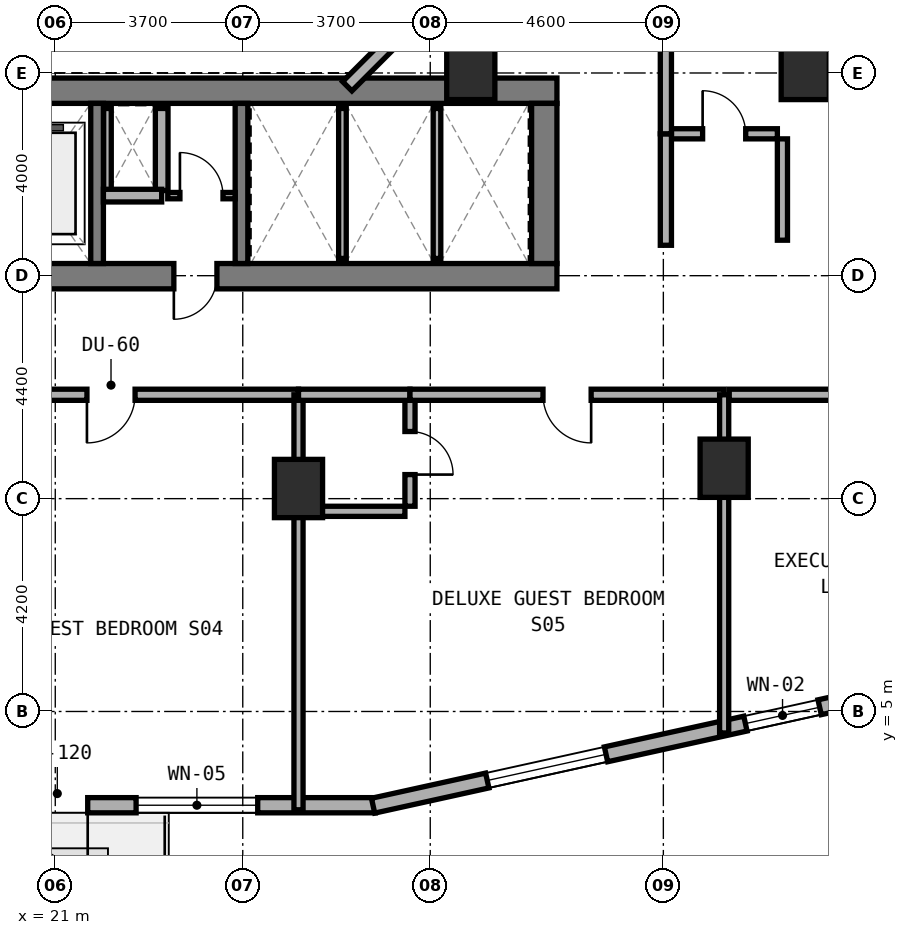
"""IFC4 building model, lengths in metres.
Left out: names, types, materials, properties, quantities, classifications, styles, units other than length and angle.
Written with IfcOpenShell. Run it as: python <this file> out.ifc"""

import sys

from ifc_helpers import new_model, si_unit, direction, frame, frame_2d, origin, origin_2d, place, context, subcontext, project, spatial, rectangle, extrude, element, fill, save


model = new_model("IFC4")
c1 = context("Model", 3, precision=1e-05, world=origin(), true_north=direction((0.0, 1.0)))
c2 = subcontext(c1, "Body", "Model", "MODEL_VIEW")
j1 = project(units=[si_unit("LENGTHUNIT", "METRE"), si_unit("PLANEANGLEUNIT", "RADIAN")], contexts=[c1])
p1 = place(None, origin())
s1 = spatial("IfcSite", under=j1, at=p1, CompositionType="ELEMENT")
p2 = place(p1, origin())
s2 = spatial("IfcBuilding", under=s1, at=p2, CompositionType="ELEMENT")
p3 = place(p2, frame((0.0, 0.0, 59.0)))
s3 = spatial("IfcBuildingStorey", under=s2, at=p3, CompositionType="ELEMENT", Elevation=59.0)
p4 = place(p3, frame((6.3, 13.59, 0.0), z_axis=(0.0, 0.0, 1.0), x_axis=(1.0, 0.0, 0.0)))
e1 = element("IfcWall", 1, at=p4, inside=s3, PredefinedType="SHEAR", context=c2, shape_type="SweptSolid", body=[
    extrude(rectangle(XDim=24.6, YDim=0.5, at=frame_2d((12.3, 0.0))), origin(), (0.0, 0.0, 1.0), 3.5),
])
p5 = place(p4, frame((9.25, 0.0, 0.0)))
e2 = element("IfcOpeningElement", 2, at=p5, cuts=e1, PredefinedType="OPENING", context=c2, shape_type="SweptSolid", body=[
    extrude(rectangle(XDim=1.2, YDim=2.15, at=frame_2d((0.6, 1.075))), frame((0.0, 0.26, 0.0), z_axis=(0.0, -1.0, 0.0), x_axis=(1.0, 0.0, 0.0)), (0.0, 0.0, 1.0), 0.52),
])
p6 = place(p4, frame((17.04, 0.0, 0.0)))
e3 = element("IfcOpeningElement", 3, at=p6, cuts=e1, PredefinedType="OPENING", context=c2, shape_type="SweptSolid", body=[
    extrude(rectangle(XDim=0.85, YDim=2.1, at=frame_2d((0.425, 1.05))), frame((0.0, 0.26, 0.0), z_axis=(0.0, -1.0, 0.0), x_axis=(1.0, 0.0, 0.0)), (0.0, 0.0, 1.0), 0.52),
])
p7 = place(p3, frame((6.3, 17.25, 0.0), z_axis=(0.0, 0.0, 1.0), x_axis=(1.0, 0.0, 0.0)))
e4 = element("IfcWall", 4, at=p7, inside=s3, PredefinedType="SHEAR", context=c2, shape_type="SweptSolid", body=[
    extrude(rectangle(XDim=24.6, YDim=0.5, at=frame_2d((12.3, 0.0))), origin(), (0.0, 0.0, 1.0), 3.5),
])
p8 = place(p3, frame((30.65, 13.84, 0.0), z_axis=(0.0, 0.0, 1.0), x_axis=(0.0, 1.0, 0.0)))
e5 = element("IfcWall", 5, at=p8, inside=s3, PredefinedType="SHEAR", context=c2, shape_type="SweptSolid", body=[
    extrude(rectangle(XDim=3.16, YDim=0.5, at=frame_2d((1.58, 0.0))), origin(), (0.0, 0.0, 1.0), 3.5),
])
for number, where, z_axis, x_axis in (
    (6, (21.825, 13.84, 0.0), (0.0, 0.0, 1.0), (0.0, 1.0, 0.0)),
    (7, (24.675, 13.84, 0.0), (0.0, 0.0, 1.0), (0.0, 1.0, 0.0)),
):
    element("IfcWall", number, at=place(p3, frame(where, z_axis=z_axis, x_axis=x_axis)), inside=s3, PredefinedType="STANDARD", context=c2, shape_type="SweptSolid", body=[
        extrude(rectangle(XDim=3.16, YDim=0.25, at=frame_2d((1.58, 0.0))), origin(), (0.0, 0.0, 1.0), 3.22),
    ])
for number, where, z_axis, x_axis in (
    (8, (25.8, 9.4, 0.0), (0.0, 0.0, 1.0), (1.0, 0.0, 0.0)),
    (9, (34.2, 9.8, 0.0), (0.0, 0.0, 1.0), (1.0, 0.0, 0.0)),
    (10, (35.8, 17.65, 0.0), (0.0, 0.0, 1.0), (1.0, 0.0, 0.0)),
    (11, (29.2, 17.65, 0.0), (0.0, 0.0, 1.0), (1.0, 0.0, 0.0)),
):
    element("IfcColumn", number, at=place(p3, frame(where, z_axis=z_axis, x_axis=x_axis)), inside=s3, PredefinedType="COLUMN", context=c2, shape_type="SweptSolid", body=[
        extrude(rectangle(XDim=0.95, YDim=1.15, at=origin_2d()), origin(), (0.0, 0.0, 1.0), 3.5),
    ])
p9 = place(p3, frame((14.727, 3.15, 0.0), z_axis=(0.0, 0.0, 1.0), x_axis=(1.0, 0.0, 0.0)))
e12 = element("IfcWall", 12, at=p9, inside=s3, PredefinedType="STANDARD", context=c2, shape_type="SweptSolid", body=[
    extrude(rectangle(XDim=12.591, YDim=0.3, at=frame_2d((6.295, 0.0))), origin(), (0.0, 0.0, 1.0), 3.22),
])
p10 = place(p9, frame((5.713, 0.0, 0.0)))
e13 = element("IfcOpeningElement", 13, at=p10, cuts=e12, PredefinedType="OPENING", context=c2, shape_type="SweptSolid", body=[
    extrude(rectangle(XDim=1.2, YDim=2.15, at=frame_2d((0.6, 1.075))), frame((0.0, 0.16, 0.0), z_axis=(0.0, -1.0, 0.0), x_axis=(1.0, 0.0, 0.0)), (0.0, 0.0, 1.0), 0.32),
])
p11 = place(p9, frame((2.318, 0.0, 0.8)))
e14 = element("IfcOpeningElement", 14, at=p11, cuts=e12, PredefinedType="OPENING", context=c2, shape_type="SweptSolid", body=[
    extrude(rectangle(XDim=2.4, YDim=1.6, at=frame_2d((1.2, 0.8))), frame((0.0, 0.16, 0.0), z_axis=(0.0, -1.0, 0.0), x_axis=(1.0, 0.0, 0.0)), (0.0, 0.0, 1.0), 0.32),
])
p12 = place(p9, frame((7.868, 0.0, 0.8)))
e15 = element("IfcOpeningElement", 15, at=p12, cuts=e12, PredefinedType="OPENING", context=c2, shape_type="SweptSolid", body=[
    extrude(rectangle(XDim=2.4, YDim=1.6, at=frame_2d((1.2, 0.8))), frame((0.0, 0.16, 0.0), z_axis=(0.0, -1.0, 0.0), x_axis=(1.0, 0.0, 0.0)), (0.0, 0.0, 1.0), 0.32),
])
p13 = place(p3, frame((27.272, 3.141, 0.0), z_axis=(0.0, 0.0, 1.0), x_axis=(0.976555357219, 0.21526642629, 0.0)))
e16 = element("IfcWall", 16, at=p13, inside=s3, PredefinedType="STANDARD", context=c2, shape_type="SweptSolid", body=[
    extrude(rectangle(XDim=9.323, YDim=0.3, at=frame_2d((4.661, 0.0))), origin(), (0.0, 0.0, 1.0), 3.22),
])
p14 = place(p13, frame((2.307, 0.0, 0.8)))
e17 = element("IfcOpeningElement", 17, at=p14, cuts=e16, PredefinedType="OPENING", context=c2, shape_type="SweptSolid", body=[
    extrude(rectangle(XDim=2.4, YDim=1.6, at=frame_2d((1.2, 0.8))), frame((0.0, 0.16, 0.0), z_axis=(0.0, -1.0, 0.0), x_axis=(1.0, 0.0, 0.0)), (0.0, 0.0, 1.0), 0.32),
])
p15 = place(p13, frame((7.524, 0.0, 0.85)))
e18 = element("IfcOpeningElement", 18, at=p15, cuts=e16, PredefinedType="OPENING", context=c2, shape_type="SweptSolid", body=[
    extrude(rectangle(XDim=1.5, YDim=1.5, at=frame_2d((0.75, 0.75))), frame((0.0, 0.16, 0.0), z_axis=(0.0, -1.0, 0.0), x_axis=(1.0, 0.0, 0.0)), (0.0, 0.0, 1.0), 0.32),
])
p16 = place(p3, frame((26.762, 17.338, 0.0), z_axis=(0.0, 0.0, 1.0), x_axis=(0.707059717605, 0.707153841636, 0.0)))
e19 = element("IfcWall", 19, at=p16, inside=s3, PredefinedType="STANDARD", context=c2, shape_type="SweptSolid", body=[
    extrude(rectangle(XDim=2.594, YDim=0.26, at=frame_2d((1.297, 0.0))), origin(), (0.0, 0.0, 1.0), 3.22),
])
p17 = place(p3, frame((22.03, 15.28, 0.0), z_axis=(0.0, 0.0, 1.0), x_axis=(0.0, 1.0, 0.0)))
e20 = element("IfcWall", 20, at=p17, inside=s3, PredefinedType="PARTITIONING", context=c2, shape_type="SweptSolid", body=[
    extrude(rectangle(XDim=1.62, YDim=0.15, at=frame_2d((0.81, 0.0))), origin(), (0.0, 0.0, 1.0), 3.22),
])
p18 = place(p3, frame((23.1, 15.28, 0.0), z_axis=(0.0, 0.0, 1.0), x_axis=(0.0, 1.0, 0.0)))
e21 = element("IfcWall", 21, at=p18, inside=s3, PredefinedType="SOLIDWALL", context=c2, shape_type="SweptSolid", body=[
    extrude(rectangle(XDim=1.62, YDim=0.25, at=frame_2d((0.81, 0.0))), origin(), (0.0, 0.0, 1.0), 3.22),
])
p19 = place(p3, frame((21.95, 15.18, 0.0), z_axis=(0.0, 0.0, 1.0), x_axis=(1.0, 0.0, 0.0)))
e22 = element("IfcWall", 22, at=p19, inside=s3, PredefinedType="SOLIDWALL", context=c2, shape_type="SweptSolid", body=[
    extrude(rectangle(XDim=1.15, YDim=0.25, at=frame_2d((0.575, 0.0))), origin(), (0.0, 0.0, 1.0), 3.22),
])
p20 = place(p3, frame((23.22, 15.18, 0.0), z_axis=(0.0, 0.0, 1.0), x_axis=(1.0, 0.0, 0.0)))
e23 = element("IfcWall", 23, at=p20, inside=s3, PredefinedType="PARTITIONING", context=c2, shape_type="SweptSolid", body=[
    extrude(rectangle(XDim=1.33, YDim=0.125, at=frame_2d((0.665, 0.0))), origin(), (0.0, 0.0, 1.0), 3.22),
])
p21 = place(p20, frame((0.24, 0.0, 0.0)))
e24 = element("IfcOpeningElement", 24, at=p21, cuts=e23, PredefinedType="OPENING", context=c2, shape_type="SweptSolid", body=[
    extrude(rectangle(XDim=0.85, YDim=2.1, at=frame_2d((0.425, 1.05))), frame((0.0, 0.073, 0.0), z_axis=(0.0, -1.0, 0.0), x_axis=(1.0, 0.0, 0.0)), (0.0, 0.0, 1.0), 0.145),
])
p22 = place(p3, frame((26.667, 13.94, 0.0), z_axis=(0.0, 0.0, 1.0), x_axis=(0.0, 1.0, 0.0)))
e25 = element("IfcWall", 25, at=p22, inside=s3, PredefinedType="PARTITIONING", context=c2, shape_type="SweptSolid", body=[
    extrude(rectangle(XDim=2.96, YDim=0.15, at=frame_2d((1.48, 0.0))), origin(), (0.0, 0.0, 1.0), 3.22),
])
p23 = place(p3, frame((28.533, 13.94, 0.0), z_axis=(0.0, 0.0, 1.0), x_axis=(0.0, 1.0, 0.0)))
e26 = element("IfcWall", 26, at=p23, inside=s3, PredefinedType="PARTITIONING", context=c2, shape_type="SweptSolid", body=[
    extrude(rectangle(XDim=2.96, YDim=0.15, at=frame_2d((1.48, 0.0))), origin(), (0.0, 0.0, 1.0), 2.495),
])
p24 = place(p3, frame((18.4, 11.25, 0.0), z_axis=(0.0, 0.0, 1.0), x_axis=(1.0, 0.0, 0.0)))
e27 = element("IfcWall", 27, at=p24, inside=s3, PredefinedType="SOLIDWALL", context=c2, shape_type="SweptSolid", body=[
    extrude(rectangle(XDim=7.4, YDim=0.22, at=frame_2d((3.7, 0.0))), origin(), (0.0, 0.0, 1.0), 2.495),
])
p25 = place(p24, frame((3.225, 0.0, 0.0)))
e28 = element("IfcOpeningElement", 28, at=p25, cuts=e27, PredefinedType="OPENING", context=c2, shape_type="SweptSolid", body=[
    extrude(rectangle(XDim=0.95, YDim=2.1, at=frame_2d((0.475, 1.05))), frame((0.0, 0.12, 0.0), z_axis=(0.0, -1.0, 0.0), x_axis=(1.0, 0.0, 0.0)), (0.0, 0.0, 1.0), 0.24),
])
p26 = place(p3, frame((25.8, 3.06, 0.0), z_axis=(0.0, 0.0, 1.0), x_axis=(0.0, 1.0, 0.0)))
e29 = element("IfcWall", 29, at=p26, inside=s3, PredefinedType="SOLIDWALL", context=c2, shape_type="SweptSolid", body=[
    extrude(rectangle(XDim=8.19, YDim=0.18, at=frame_2d((4.095, 0.0))), origin(), (0.0, 0.0, 1.0), 2.495),
])
p27 = place(p3, frame((28.0, 9.05, 0.0), z_axis=(0.0, 0.0, 1.0), x_axis=(0.0, 1.0, 0.0)))
e30 = element("IfcWall", 30, at=p27, inside=s3, PredefinedType="PLUMBINGWALL", context=c2, shape_type="SweptSolid", body=[
    extrude(rectangle(XDim=2.1, YDim=0.2, at=frame_2d((1.05, 0.0))), origin(), (0.0, 0.0, 1.0), 2.745),
])
p28 = place(p27, frame((0.625, 0.0, 0.0)))
e31 = element("IfcOpeningElement", 31, at=p28, cuts=e30, PredefinedType="OPENING", context=c2, shape_type="SweptSolid", body=[
    extrude(rectangle(XDim=0.85, YDim=2.1, at=frame_2d((0.425, 1.05))), frame((0.0, 0.11, 0.0), z_axis=(0.0, -1.0, 0.0), x_axis=(1.0, 0.0, 0.0)), (0.0, 0.0, 1.0), 0.22),
])
p29 = place(p3, frame((25.9, 8.95, 0.0), z_axis=(0.0, 0.0, 1.0), x_axis=(1.0, 0.0, 0.0)))
e32 = element("IfcWall", 32, at=p29, inside=s3, PredefinedType="PLUMBINGWALL", context=c2, shape_type="SweptSolid", body=[
    extrude(rectangle(XDim=2.0, YDim=0.2, at=frame_2d((1.0, 0.0))), origin(), (0.0, 0.0, 1.0), 3.22),
])
p30 = place(p3, frame((25.8, 11.25, 0.0), z_axis=(0.0, 0.0, 1.0), x_axis=(1.0, 0.0, 0.0)))
e33 = element("IfcWall", 33, at=p30, inside=s3, PredefinedType="SOLIDWALL", context=c2, shape_type="SweptSolid", body=[
    extrude(rectangle(XDim=2.2, YDim=0.22, at=frame_2d((1.1, 0.0))), origin(), (0.0, 0.0, 1.0), 2.495),
])
p31 = place(p3, frame((28.0, 11.25, 0.0), z_axis=(0.0, 0.0, 1.0), x_axis=(1.0, 0.0, 0.0)))
e34 = element("IfcWall", 34, at=p31, inside=s3, PredefinedType="SOLIDWALL", context=c2, shape_type="SweptSolid", body=[
    extrude(rectangle(XDim=6.2, YDim=0.22, at=frame_2d((3.1, 0.0))), origin(), (0.0, 0.0, 1.0), 2.495),
])
p32 = place(p31, frame((2.625, 0.0, 0.0)))
e35 = element("IfcOpeningElement", 35, at=p32, cuts=e34, PredefinedType="OPENING", context=c2, shape_type="SweptSolid", body=[
    extrude(rectangle(XDim=0.95, YDim=2.1, at=frame_2d((0.475, 1.05))), frame((0.0, 0.12, 0.0), z_axis=(0.0, -1.0, 0.0), x_axis=(1.0, 0.0, 0.0)), (0.0, 0.0, 1.0), 0.24),
])
p33 = place(p3, frame((34.2, 4.576, 0.0), z_axis=(0.0, 0.0, 1.0), x_axis=(0.0, 1.0, 0.0)))
e36 = element("IfcWall", 36, at=p33, inside=s3, PredefinedType="SOLIDWALL", context=c2, shape_type="SweptSolid", body=[
    extrude(rectangle(XDim=6.674, YDim=0.18, at=frame_2d((3.337, 0.0))), origin(), (0.0, 0.0, 1.0), 2.495),
])
p34 = place(p3, frame((34.3, 11.25, 0.0), z_axis=(0.0, 0.0, 1.0), x_axis=(1.0, 0.0, 0.0)))
e37 = element("IfcWall", 37, at=p34, inside=s3, PredefinedType="SOLIDWALL", context=c2, shape_type="SweptSolid", body=[
    extrude(rectangle(XDim=7.44, YDim=0.22, at=frame_2d((3.72, 0.0))), origin(), (0.0, 0.0, 1.0), 2.745),
])
p35 = place(p34, frame((2.911, 0.0, 0.0)))
e38 = element("IfcOpeningElement", 38, at=p35, cuts=e37, PredefinedType="OPENING", context=c2, shape_type="SweptSolid", body=[
    extrude(rectangle(XDim=0.95, YDim=2.1, at=frame_2d((0.475, 1.05))), frame((0.0, 0.12, 0.0), z_axis=(0.0, -1.0, 0.0), x_axis=(1.0, 0.0, 0.0)), (0.0, 0.0, 1.0), 0.24),
])
p36 = place(p3, frame((33.15, 16.4, 0.0), z_axis=(0.0, 0.0, 1.0), x_axis=(1.0, 0.0, 0.0)))
e39 = element("IfcWall", 39, at=p36, inside=s3, PredefinedType="PLUMBINGWALL", context=c2, shape_type="SweptSolid", body=[
    extrude(rectangle(XDim=2.1, YDim=0.2, at=frame_2d((1.05, 0.0))), origin(), (0.0, 0.0, 1.0), 3.22),
])
p37 = place(p36, frame((0.625, 0.0, 0.0)))
e40 = element("IfcOpeningElement", 40, at=p37, cuts=e39, PredefinedType="OPENING", context=c2, shape_type="SweptSolid", body=[
    extrude(rectangle(XDim=0.85, YDim=2.1, at=frame_2d((0.425, 1.05))), frame((0.0, 0.11, 0.0), z_axis=(0.0, -1.0, 0.0), x_axis=(1.0, 0.0, 0.0)), (0.0, 0.0, 1.0), 0.22),
])
p38 = place(p3, frame((35.35, 14.3, 0.0), z_axis=(0.0, 0.0, 1.0), x_axis=(0.0, 1.0, 0.0)))
e41 = element("IfcWall", 41, at=p38, inside=s3, PredefinedType="PLUMBINGWALL", context=c2, shape_type="SweptSolid", body=[
    extrude(rectangle(XDim=2.0, YDim=0.2, at=frame_2d((1.0, 0.0))), origin(), (0.0, 0.0, 1.0), 2.745),
])
p39 = place(p3, frame((33.05, 14.2, 0.0), z_axis=(0.0, 0.0, 1.0), x_axis=(0.0, 1.0, 0.0)))
e42 = element("IfcWall", 42, at=p39, inside=s3, PredefinedType="SOLIDWALL", context=c2, shape_type="SweptSolid", body=[
    extrude(rectangle(XDim=2.2, YDim=0.22, at=frame_2d((1.1, 0.0))), origin(), (0.0, 0.0, 1.0), 3.22),
])
p40 = place(p3, frame((33.05, 16.4, 0.0), z_axis=(0.0, 0.0, 1.0), x_axis=(0.0, 1.0, 0.0)))
e43 = element("IfcWall", 43, at=p40, inside=s3, PredefinedType="SOLIDWALL", context=c2, shape_type="SweptSolid", body=[
    extrude(rectangle(XDim=6.134, YDim=0.22, at=frame_2d((3.067, 0.0))), origin(), (0.0, 0.0, 1.0), 2.495),
])
p41 = place(p40, frame((2.592, 0.0, 0.0)))
e44 = element("IfcOpeningElement", 44, at=p41, cuts=e43, PredefinedType="OPENING", context=c2, shape_type="SweptSolid", body=[
    extrude(rectangle(XDim=0.95, YDim=2.1, at=frame_2d((0.475, 1.05))), frame((0.0, 0.12, 0.0), z_axis=(0.0, -1.0, 0.0), x_axis=(1.0, 0.0, 0.0)), (0.0, 0.0, 1.0), 0.24),
])
p42 = place(p10, frame((1.2, 0.0, 0.0), z_axis=(0.0, 0.0, 1.0), x_axis=(-1.0, 0.0, 0.0)))
e45 = element("IfcDoor", 45, at=p42, inside=s3, OperationType="SINGLE_SWING_LEFT", PredefinedType="DOOR", context=c2, shape_type="SweptSolid", body=[
    extrude(rectangle(XDim=1.2, YDim=2.15, at=frame_2d((0.6, 1.075))), frame((0.0, 0.025, 0.0), z_axis=(0.0, -1.0, 0.0), x_axis=(1.0, 0.0, 0.0)), (0.0, 0.0, 1.0), 0.05),
])
fill(e13, e45)
p43 = place(p12, origin())
e46 = element("IfcWindow", 46, at=p43, inside=s3, PartitioningType="SINGLE_PANEL", PredefinedType="WINDOW", context=c2, shape_type="SweptSolid", body=[
    extrude(rectangle(XDim=2.4, YDim=1.6, at=frame_2d((1.2, 0.8))), frame((0.0, 0.03, 0.0), z_axis=(0.0, -1.0, 0.0), x_axis=(1.0, 0.0, 0.0)), (0.0, 0.0, 1.0), 0.06),
])
fill(e15, e46)
p44 = place(p14, origin())
e47 = element("IfcWindow", 47, at=p44, inside=s3, PartitioningType="SINGLE_PANEL", PredefinedType="WINDOW", context=c2, shape_type="SweptSolid", body=[
    extrude(rectangle(XDim=2.4, YDim=1.6, at=frame_2d((1.2, 0.8))), frame((0.0, 0.03, 0.0), z_axis=(0.0, -1.0, 0.0), x_axis=(1.0, 0.0, 0.0)), (0.0, 0.0, 1.0), 0.06),
])
fill(e17, e47)
p45 = place(p15, origin())
e48 = element("IfcWindow", 48, at=p45, inside=s3, PartitioningType="SINGLE_PANEL", PredefinedType="WINDOW", context=c2, shape_type="SweptSolid", body=[
    extrude(rectangle(XDim=1.5, YDim=1.5, at=frame_2d((0.75, 0.75))), frame((0.0, 0.03, 0.0), z_axis=(0.0, -1.0, 0.0), x_axis=(1.0, 0.0, 0.0)), (0.0, 0.0, 1.0), 0.06),
])
fill(e18, e48)
p46 = place(p6, frame((0.85, 0.0, 0.0), z_axis=(0.0, 0.0, 1.0), x_axis=(-1.0, 0.0, 0.0)))
e49 = element("IfcDoor", 49, at=p46, inside=s3, OperationType="SINGLE_SWING_RIGHT", PredefinedType="DOOR", context=c2, shape_type="SweptSolid", body=[
    extrude(rectangle(XDim=0.85, YDim=2.1, at=frame_2d((0.425, 1.05))), frame((0.0, 0.025, 0.0), z_axis=(0.0, -1.0, 0.0), x_axis=(1.0, 0.0, 0.0)), (0.0, 0.0, 1.0), 0.05),
])
fill(e3, e49)
p47 = place(p21, origin())
e50 = element("IfcDoor", 50, at=p47, inside=s3, OperationType="SINGLE_SWING_LEFT", PredefinedType="DOOR", context=c2, shape_type="SweptSolid", body=[
    extrude(rectangle(XDim=0.85, YDim=2.1, at=frame_2d((0.425, 1.05))), frame((0.0, 0.025, 0.0), z_axis=(0.0, -1.0, 0.0), x_axis=(1.0, 0.0, 0.0)), (0.0, 0.0, 1.0), 0.05),
])
fill(e24, e50)
p48 = place(p25, frame((0.95, 0.0, 0.0), z_axis=(0.0, 0.0, 1.0), x_axis=(-1.0, 0.0, 0.0)))
e51 = element("IfcDoor", 51, at=p48, inside=s3, OperationType="SINGLE_SWING_RIGHT", PredefinedType="DOOR", context=c2, shape_type="SweptSolid", body=[
    extrude(rectangle(XDim=0.95, YDim=2.1, at=frame_2d((0.475, 1.05))), frame((0.0, 0.025, 0.0), z_axis=(0.0, -1.0, 0.0), x_axis=(1.0, 0.0, 0.0)), (0.0, 0.0, 1.0), 0.05),
])
fill(e28, e51)
p49 = place(p28, frame((0.85, 0.0, 0.0), z_axis=(0.0, 0.0, 1.0), x_axis=(-1.0, 0.0, 0.0)))
e52 = element("IfcDoor", 52, at=p49, inside=s3, OperationType="SINGLE_SWING_RIGHT", PredefinedType="DOOR", context=c2, shape_type="SweptSolid", body=[
    extrude(rectangle(XDim=0.85, YDim=2.1, at=frame_2d((0.425, 1.05))), frame((0.0, 0.025, 0.0), z_axis=(0.0, -1.0, 0.0), x_axis=(1.0, 0.0, 0.0)), (0.0, 0.0, 1.0), 0.05),
])
fill(e31, e52)
p50 = place(p32, frame((0.95, 0.0, 0.0), z_axis=(0.0, 0.0, 1.0), x_axis=(-1.0, 0.0, 0.0)))
e53 = element("IfcDoor", 53, at=p50, inside=s3, OperationType="SINGLE_SWING_LEFT", PredefinedType="DOOR", context=c2, shape_type="SweptSolid", body=[
    extrude(rectangle(XDim=0.95, YDim=2.1, at=frame_2d((0.475, 1.05))), frame((0.0, 0.025, 0.0), z_axis=(0.0, -1.0, 0.0), x_axis=(1.0, 0.0, 0.0)), (0.0, 0.0, 1.0), 0.05),
])
fill(e35, e53)
p51 = place(p37, origin())
e54 = element("IfcDoor", 54, at=p51, inside=s3, OperationType="SINGLE_SWING_LEFT", PredefinedType="DOOR", context=c2, shape_type="SweptSolid", body=[
    extrude(rectangle(XDim=0.85, YDim=2.1, at=frame_2d((0.425, 1.05))), frame((0.0, 0.025, 0.0), z_axis=(0.0, -1.0, 0.0), x_axis=(1.0, 0.0, 0.0)), (0.0, 0.0, 1.0), 0.05),
])
fill(e40, e54)
save(model, sys.argv[1])
